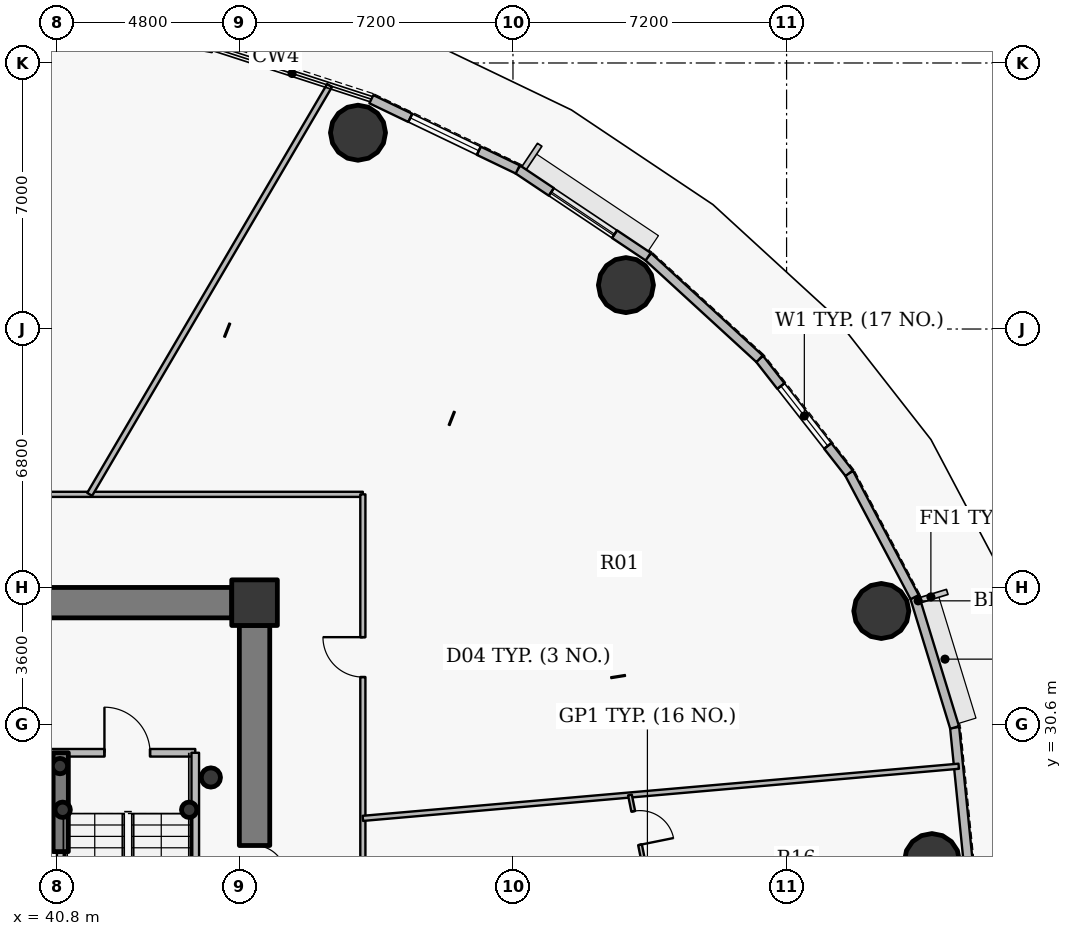
"""IFC4 building model, lengths in metres.
Left out: names, types, materials, properties, quantities, classifications, styles, units other than length and angle.
Written with IfcOpenShell. Run it as: python <this file> out.ifc"""

import sys

from ifc_helpers import new_model, si_unit, direction, frame, frame_2d, origin, origin_2d, place, context, subcontext, project, spatial, rectangle, hollow_circle, extrude, source, transform, mapped, element, fill, save


model = new_model("IFC4")
c1 = context("Model", 3, precision=1e-05, world=origin(), true_north=direction((0.0, 1.0)))
c2 = subcontext(c1, "Body", "Model", "MODEL_VIEW")
j1 = project(units=[si_unit("LENGTHUNIT", "METRE"), si_unit("PLANEANGLEUNIT", "RADIAN")], contexts=[c1])
p1 = place(None, origin())
s1 = spatial("IfcSite", under=j1, at=p1, CompositionType="ELEMENT")
p2 = place(p1, origin())
s2 = spatial("IfcBuilding", under=s1, at=p2, CompositionType="ELEMENT")
p3 = place(p2, frame((0.0, 0.0, 92.4)))
s3 = spatial("IfcBuildingStorey", under=s2, at=p3, CompositionType="ELEMENT", Elevation=92.4)
p4 = place(p3, frame((46.0, 33.8, 0.0), z_axis=(0.0, 0.0, 1.0), x_axis=(1.0, 0.0, 0.0)))
e1 = element("IfcColumn", 1, at=p4, inside=s3, PredefinedType="COLUMN", context=c2, shape_type="SweptSolid", body=[
    extrude(rectangle(XDim=1.2, YDim=1.2, at=origin_2d()), origin(), (0.0, 0.0, 1.0), 4.8),
])
for number, where, z_axis, x_axis in (
    (2, (40.95, 28.35, 0.0), (0.0, 0.0, 1.0), (1.0, 0.0, 0.0)),
    (3, (44.28, 28.35, 0.0), (0.0, 0.0, 1.0), (1.0, 0.0, 0.0)),
    (4, (40.88, 29.5, 0.0), (0.0, 0.0, 1.0), (1.0, 0.0, 0.0)),
):
    element("IfcColumn", number, at=place(p3, frame(where, z_axis=z_axis, x_axis=x_axis)), inside=s3, PredefinedType="COLUMN", context=c2, shape_type="SweptSolid", body=[
        extrude(hollow_circle(Radius=0.203, WallThickness=0.016, at=origin_2d()), origin(), (0.0, 0.0, 1.0), 4.8),
    ])
p5 = place(p3, frame((26.6, 33.8, 0.0), z_axis=(0.0, 0.0, 1.0), x_axis=(1.0, 0.0, 0.0)))
e5 = element("IfcWall", 5, at=p5, inside=s3, PredefinedType="SHEAR", context=c2, shape_type="SweptSolid", body=[
    extrude(rectangle(XDim=18.8, YDim=0.8, at=frame_2d((9.4, 0.0))), origin(), (0.0, 0.0, 1.0), 4.0),
])
p6 = place(p3, frame((46.0, 33.2, 0.0), z_axis=(0.0, 0.0, 1.0), x_axis=(0.0, -1.0, 0.0)))
e6 = element("IfcWall", 6, at=p6, inside=s3, PredefinedType="SHEAR", context=c2, shape_type="SweptSolid", body=[
    extrude(rectangle(XDim=12.4, YDim=0.8, at=frame_2d((6.2, 0.0))), origin(), (0.0, 0.0, 1.0), 4.0),
])
p7 = place(p6, frame((5.79, 0.0, 0.0)))
e7 = element("IfcOpeningElement", 7, at=p7, cuts=e6, PredefinedType="OPENING", context=c2, shape_type="SweptSolid", body=[
    extrude(rectangle(XDim=0.82, YDim=2.1, at=origin_2d()), frame((0.41, 0.41, 1.05), z_axis=(0.0, -1.0, 0.0), x_axis=(1.0, 0.0, 0.0)), (0.0, 0.0, 1.0), 0.82),
])
p8 = place(p3, frame((40.9, 27.25, 0.0), z_axis=(0.0, 0.0, 1.0), x_axis=(0.0, 1.0, 0.0)))
e8 = element("IfcWall", 8, at=p8, inside=s3, PredefinedType="SHEAR", context=c2, shape_type="SweptSolid", body=[
    extrude(rectangle(XDim=2.6, YDim=0.4, at=frame_2d((1.3, 0.0))), origin(), (0.0, 0.0, 1.0), 4.15),
])
for number, where, z_axis, x_axis in (
    (9, (63.825, 27.0, -0.3), (0.0, 0.0, 1.0), (1.0, 0.0, 0.0)),
    (10, (62.493, 33.581, -0.3), (0.0, 0.0, 1.0), (1.0, 0.0, 0.0)),
    (11, (55.773, 42.156, -0.3), (0.0, 0.0, 1.0), (1.0, 0.0, 0.0)),
    (12, (48.722, 46.165, -0.3), (0.0, 0.0, 1.0), (1.0, 0.0, 0.0)),
):
    element("IfcColumn", number, at=place(p3, frame(where, z_axis=z_axis, x_axis=x_axis)), inside=s3, PredefinedType="COLUMN", context=c2, shape_type="SweptSolid", body=[
        extrude(hollow_circle(Radius=0.725, WallThickness=0.042, at=origin_2d()), origin(), (0.0, 0.0, 1.0), 5.1),
    ])
p9 = place(p3, frame((44.85, 29.2, 0.0), z_axis=(0.0, 0.0, 1.0), x_axis=(1.0, 0.0, 0.0)))
e13 = element("IfcColumn", 13, at=p9, inside=s3, PredefinedType="COLUMN", context=c2, shape_type="SweptSolid", body=[
    extrude(hollow_circle(Radius=0.254, WallThickness=0.02, at=origin_2d()), origin(), (0.0, 0.0, 1.0), 4.8),
])
p10 = place(p3, frame((64.422, 30.515, 0.0), z_axis=(0.0, 0.0, 1.0), x_axis=(0.099989468229, -0.994988495533, 0.0)))
e14 = element("IfcWall", 14, at=p10, inside=s3, PredefinedType="SOLIDWALL", context=c2, shape_type="SweptSolid", body=[
    extrude(rectangle(XDim=3.533, YDim=0.24, at=frame_2d((1.767, 0.0))), origin(), (0.0, 0.0, 1.0), 4.55),
])
p11 = place(p3, frame((63.37, 33.945, 0.0), z_axis=(0.0, 0.0, 1.0), x_axis=(0.293124431344, -0.956074300329, 0.0)))
e15 = element("IfcWall", 15, at=p11, inside=s3, PredefinedType="SOLIDWALL", context=c2, shape_type="SweptSolid", body=[
    extrude(rectangle(XDim=3.587, YDim=0.24, at=frame_2d((1.793, 0.0))), origin(), (0.0, 0.0, 1.0), 4.55),
])
p12 = place(p3, frame((61.645, 37.206, 0.0), z_axis=(0.0, 0.0, 1.0), x_axis=(0.467614004126, -0.883932770716, 0.0)))
e16 = element("IfcWall", 16, at=p12, inside=s3, PredefinedType="SOLIDWALL", context=c2, shape_type="SweptSolid", body=[
    extrude(rectangle(XDim=3.689, YDim=0.24, at=frame_2d((1.844, 0.0))), origin(), (0.0, 0.0, 1.0), 4.55),
])
p13 = place(p3, frame((59.289, 40.217, 0.0), z_axis=(0.0, 0.0, 1.0), x_axis=(0.616272103517, -0.787533297345, 0.0)))
e17 = element("IfcWall", 17, at=p13, inside=s3, PredefinedType="SOLIDWALL", context=c2, shape_type="SweptSolid", body=[
    extrude(rectangle(XDim=3.823, YDim=0.24, at=frame_2d((1.912, 0.0))), origin(), (0.0, 0.0, 1.0), 4.55),
])
p14 = place(p13, frame((0.912, 0.0, 0.9)))
e18 = element("IfcOpeningElement", 18, at=p14, cuts=e17, PredefinedType="OPENING", context=c2, shape_type="SweptSolid", body=[
    extrude(rectangle(XDim=2.0, YDim=1.75, at=origin_2d()), frame((1.0, 0.13, 0.875), z_axis=(0.0, -1.0, 0.0), x_axis=(1.0, 0.0, 0.0)), (0.0, 0.0, 1.0), 0.26),
])
p15 = place(p3, frame((56.358, 42.903, 0.0), z_axis=(0.0, 0.0, 1.0), x_axis=(0.737113356241, -0.675769117414, 0.0)))
e19 = element("IfcWall", 19, at=p15, inside=s3, PredefinedType="SOLIDWALL", context=c2, shape_type="SweptSolid", body=[
    extrude(rectangle(XDim=3.976, YDim=0.24, at=frame_2d((1.988, 0.0))), origin(), (0.0, 0.0, 1.0), 4.55),
])
p16 = place(p3, frame((52.925, 45.199, 0.0), z_axis=(0.0, 0.0, 1.0), x_axis=(0.831221811447, -0.555940914284, 0.0)))
e20 = element("IfcWall", 20, at=p16, inside=s3, PredefinedType="SOLIDWALL", context=c2, shape_type="SweptSolid", body=[
    extrude(rectangle(XDim=4.13, YDim=0.24, at=frame_2d((2.065, 0.0))), origin(), (0.0, 0.0, 1.0), 4.55),
])
p17 = place(p16, frame((1.065, 0.0, 0.9)))
e21 = element("IfcOpeningElement", 21, at=p17, cuts=e20, PredefinedType="OPENING", context=c2, shape_type="SweptSolid", body=[
    extrude(rectangle(XDim=2.0, YDim=1.75, at=origin_2d()), frame((1.0, 0.13, 0.875), z_axis=(0.0, -1.0, 0.0), x_axis=(1.0, 0.0, 0.0)), (0.0, 0.0, 1.0), 0.26),
])
p18 = place(p3, frame((49.074, 47.047, 0.0), z_axis=(0.0, 0.0, 1.0), x_axis=(0.901589935876, -0.432591709962, 0.0)))
e22 = element("IfcWall", 22, at=p18, inside=s3, PredefinedType="SOLIDWALL", context=c2, shape_type="SweptSolid", body=[
    extrude(rectangle(XDim=4.272, YDim=0.24, at=frame_2d((2.136, 0.0))), origin(), (0.0, 0.0, 1.0), 4.55),
])
p19 = place(p18, frame((1.136, 0.0, 0.9)))
e23 = element("IfcOpeningElement", 23, at=p19, cuts=e22, PredefinedType="OPENING", context=c2, shape_type="SweptSolid", body=[
    extrude(rectangle(XDim=2.0, YDim=1.75, at=origin_2d()), frame((1.0, 0.13, 0.875), z_axis=(0.0, -1.0, 0.0), x_axis=(1.0, 0.0, 0.0)), (0.0, 0.0, 1.0), 0.26),
])
p20 = place(p3, frame((40.506, 49.227, 0.0), z_axis=(0.0, 0.0, 1.0), x_axis=(0.982789252177, -0.184730305596, 0.0)))
e24 = element("IfcWall", 24, at=p20, inside=s3, PredefinedType="SOLIDWALL", context=c2, shape_type="SweptSolid", body=[
    extrude(rectangle(XDim=4.471, YDim=0.24, at=frame_2d((2.235, 0.0))), origin(), (0.0, 0.0, 1.0), 4.55),
])
p21 = place(p20, frame((1.236, 0.0, 0.9)))
e25 = element("IfcOpeningElement", 25, at=p21, cuts=e24, PredefinedType="OPENING", context=c2, shape_type="SweptSolid", body=[
    extrude(rectangle(XDim=2.0, YDim=1.75, at=origin_2d()), frame((1.0, 0.13, 0.875), z_axis=(0.0, -1.0, 0.0), x_axis=(1.0, 0.0, 0.0)), (0.0, 0.0, 1.0), 0.26),
])
p22 = place(p3, frame((23.15, 36.65, 0.0), z_axis=(0.0, 0.0, 1.0), x_axis=(1.0, 0.0, 0.0)))
e26 = element("IfcWall", 26, at=p22, inside=s3, PredefinedType="PARTITIONING", context=c2, shape_type="SweptSolid", body=[
    extrude(rectangle(XDim=25.7, YDim=0.135, at=frame_2d((12.85, 0.0))), origin(), (0.0, 0.0, 1.0), 3.985),
])
p23 = place(p22, frame((13.736, 0.0, 0.0)))
e27 = element("IfcOpeningElement", 27, at=p23, cuts=e26, PredefinedType="OPENING", context=c2, shape_type="SweptSolid", body=[
    extrude(rectangle(XDim=1.05, YDim=2.15, at=origin_2d()), frame((0.525, 0.078, 1.075), z_axis=(0.0, -1.0, 0.0), x_axis=(1.0, 0.0, 0.0)), (0.0, 0.0, 1.0), 0.155),
])
p24 = place(p22, frame((6.195, 0.0, 0.0)))
e28 = element("IfcOpeningElement", 28, at=p24, cuts=e26, PredefinedType="OPENING", context=c2, shape_type="SweptSolid", body=[
    extrude(rectangle(XDim=0.82, YDim=2.1, at=origin_2d()), frame((0.41, 0.078, 1.05), z_axis=(0.0, -1.0, 0.0), x_axis=(1.0, 0.0, 0.0)), (0.0, 0.0, 1.0), 0.155),
])
p25 = place(p3, frame((35.95, 29.85, 0.0), z_axis=(0.0, 0.0, 1.0), x_axis=(1.0, 0.0, 0.0)))
e29 = element("IfcWall", 29, at=p25, inside=s3, PredefinedType="PARTITIONING", context=c2, shape_type="SweptSolid", body=[
    extrude(rectangle(XDim=8.49, YDim=0.2, at=frame_2d((4.245, 0.0))), origin(), (0.0, 0.0, 1.0), 4.135),
])
p26 = place(p25, frame((6.1, 0.0, 0.0)))
e30 = element("IfcOpeningElement", 30, at=p26, cuts=e29, PredefinedType="OPENING", context=c2, shape_type="SweptSolid", body=[
    extrude(rectangle(XDim=1.2, YDim=2.15, at=origin_2d()), frame((0.6, 0.11, 1.075), z_axis=(0.0, -1.0, 0.0), x_axis=(1.0, 0.0, 0.0)), (0.0, 0.0, 1.0), 0.22),
])
p27 = place(p25, frame((0.37, 0.0, 0.0)))
e31 = element("IfcOpeningElement", 31, at=p27, cuts=e29, PredefinedType="OPENING", context=c2, shape_type="SweptSolid", body=[
    extrude(rectangle(XDim=1.15, YDim=2.15, at=origin_2d()), frame((0.575, 0.11, 1.075), z_axis=(0.0, -1.0, 0.0), x_axis=(1.0, 0.0, 0.0)), (0.0, 0.0, 1.0), 0.22),
])
p28 = place(p25, frame((2.425, 0.0, 0.0)))
e32 = element("IfcOpeningElement", 32, at=p28, cuts=e29, PredefinedType="OPENING", context=c2, shape_type="SweptSolid", body=[
    extrude(rectangle(XDim=1.05, YDim=2.15, at=origin_2d()), frame((0.525, 0.11, 1.075), z_axis=(0.0, -1.0, 0.0), x_axis=(1.0, 0.0, 0.0)), (0.0, 0.0, 1.0), 0.22),
])
p29 = place(p3, frame((40.0, 27.85, 0.0), z_axis=(0.0, 0.0, 1.0), x_axis=(1.0, 0.0, 0.0)))
e33 = element("IfcWall", 33, at=p29, inside=s3, PredefinedType="PARTITIONING", context=c2, shape_type="SweptSolid", body=[
    extrude(rectangle(XDim=0.9, YDim=0.2, at=frame_2d((0.45, 0.0))), origin(), (0.0, 0.0, 1.0), 4.55),
])
p30 = place(p3, frame((40.9, 21.33, 0.0), z_axis=(0.0, 0.0, 1.0), x_axis=(0.0, 1.0, 0.0)))
e34 = element("IfcWall", 34, at=p30, inside=s3, PredefinedType="PARTITIONING", context=c2, shape_type="SweptSolid", body=[
    extrude(rectangle(XDim=5.91, YDim=0.2, at=frame_2d((2.955, 0.0))), origin(), (0.0, 0.0, 1.0), 4.085),
])
p31 = place(p3, frame((41.662, 36.65, 0.0), z_axis=(0.0, 0.0, 1.0), x_axis=(0.506029365316, 0.862516249956, 0.0)))
e35 = element("IfcWall", 35, at=p31, inside=s3, PredefinedType="PARTITIONING", context=c2, shape_type="SweptSolid", body=[
    extrude(rectangle(XDim=12.475, YDim=0.15, at=frame_2d((6.237, 0.0))), origin(), (0.0, 0.0, 1.0), 3.985),
])
p32 = place(p3, frame((44.44, 21.33, 0.0), z_axis=(0.0, 0.0, 1.0), x_axis=(0.0, 1.0, 0.0)))
e36 = element("IfcWall", 36, at=p32, inside=s3, PredefinedType="PARTITIONING", context=c2, shape_type="SweptSolid", body=[
    extrude(rectangle(XDim=8.52, YDim=0.2, at=frame_2d((4.26, 0.0))), origin(), (0.0, 0.0, 1.0), 4.55),
])
p33 = place(p3, frame((48.85, 17.35, 0.0), z_axis=(0.0, 0.0, 1.0), x_axis=(0.0, 1.0, 0.0)))
e37 = element("IfcWall", 37, at=p33, inside=s3, PredefinedType="PARTITIONING", context=c2, shape_type="SweptSolid", body=[
    extrude(rectangle(XDim=19.3, YDim=0.135, at=frame_2d((9.65, 0.0))), origin(), (0.0, 0.0, 1.0), 3.985),
])
p34 = place(p33, frame((4.907, 0.0, 0.0)))
e38 = element("IfcOpeningElement", 38, at=p34, cuts=e37, PredefinedType="OPENING", context=c2, shape_type="SweptSolid", body=[
    extrude(rectangle(XDim=1.0, YDim=2.15, at=origin_2d()), frame((0.5, 0.078, 1.075), z_axis=(0.0, -1.0, 0.0), x_axis=(1.0, 0.0, 0.0)), (0.0, 0.0, 1.0), 0.155),
])
p35 = place(p33, frame((14.492, 0.0, 0.0)))
e39 = element("IfcOpeningElement", 39, at=p35, cuts=e37, PredefinedType="OPENING", context=c2, shape_type="SweptSolid", body=[
    extrude(rectangle(XDim=1.05, YDim=2.15, at=origin_2d()), frame((0.525, 0.078, 1.075), z_axis=(0.0, -1.0, 0.0), x_axis=(1.0, 0.0, 0.0)), (0.0, 0.0, 1.0), 0.155),
])
p36 = place(p3, frame((48.85, 28.124, 0.0), z_axis=(0.0, 0.0, 1.0), x_axis=(0.99619417209, 0.087161754768, 0.0)))
e40 = element("IfcWall", 40, at=p36, inside=s3, PredefinedType="PARTITIONING", context=c2, shape_type="SweptSolid", body=[
    extrude(rectangle(XDim=15.739, YDim=0.135, at=frame_2d((7.869, 0.0))), origin(), (0.0, 0.0, 1.0), 3.985),
])
p37 = place(p3, frame((55.878, 28.739, 0.0), z_axis=(0.0, 0.0, 1.0), x_axis=(0.198285544288, -0.980144296992, 0.0)))
e41 = element("IfcWall", 41, at=p37, inside=s3, PredefinedType="PARTITIONING", context=c2, shape_type="SweptSolid", body=[
    extrude(rectangle(XDim=1.774, YDim=0.1, at=frame_2d((0.887, 0.0))), origin(), (0.0, 0.0, 1.0), 3.985),
])
p38 = place(p37, frame((0.437, 0.0, 0.0)))
e42 = element("IfcOpeningElement", 42, at=p38, cuts=e41, PredefinedType="OPENING", context=c2, shape_type="SweptSolid", body=[
    extrude(rectangle(XDim=0.9, YDim=2.1, at=origin_2d()), frame((0.45, 0.06, 1.05), z_axis=(0.0, -1.0, 0.0), x_axis=(1.0, 0.0, 0.0)), (0.0, 0.0, 1.0), 0.12),
])
p39 = place(p3, frame((46.4, 34.2, 0.0), z_axis=(0.0, 0.0, 1.0), x_axis=(-1.0, 0.0, 0.0)))
e43 = element("IfcWall", 43, at=p39, inside=s3, PredefinedType="PARTITIONING", context=c2, shape_type="SweptSolid", body=[
    extrude(rectangle(XDim=0.99, YDim=0.135, at=frame_2d((0.495, 0.0))), origin(), (0.0, 0.0, 1.0), 3.985),
])
p40 = place(p3, frame((46.4, 33.21, 0.0), z_axis=(0.0, 0.0, 1.0), x_axis=(0.0, 1.0, 0.0)))
e44 = element("IfcWall", 44, at=p40, inside=s3, PredefinedType="PARTITIONING", context=c2, shape_type="SweptSolid", body=[
    extrude(rectangle(XDim=0.683, YDim=0.135, at=frame_2d((0.341, 0.0))), origin(), (0.0, 0.0, 1.0), 4.55),
])
m1 = source(origin(), c2, "Body", "SweptSolid", [
    extrude(rectangle(XDim=2.0, YDim=1.75, at=origin_2d()), frame((1.0, 0.03, 0.875), z_axis=(0.0, -1.0, 0.0), x_axis=(1.0, 0.0, 0.0)), (0.0, 0.0, 1.0), 0.06),
])
p41 = place(p14, origin())
e45 = element("IfcWindow", 45, at=p41, inside=s3, PartitioningType="DOUBLE_PANEL_VERTICAL", PredefinedType="WINDOW", context=c2, shape_type="MappedRepresentation", body=[
    mapped(m1, transform((0.0, 0.0, 0.0), x_axis=(1.0, 0.0, 0.0), y_axis=(0.0, 1.0, 0.0), z_axis=(0.0, 0.0, 1.0), scale=1.0)),
])
fill(e18, e45)
p42 = place(p17, origin())
e46 = element("IfcWindow", 46, at=p42, inside=s3, PartitioningType="DOUBLE_PANEL_VERTICAL", PredefinedType="WINDOW", context=c2, shape_type="MappedRepresentation", body=[
    mapped(m1, transform((0.0, 0.0, 0.0), x_axis=(1.0, 0.0, 0.0), y_axis=(0.0, 1.0, 0.0), z_axis=(0.0, 0.0, 1.0), scale=1.0)),
])
fill(e21, e46)
p43 = place(p19, origin())
e47 = element("IfcWindow", 47, at=p43, inside=s3, PartitioningType="DOUBLE_PANEL_VERTICAL", PredefinedType="WINDOW", context=c2, shape_type="MappedRepresentation", body=[
    mapped(m1, transform((0.0, 0.0, 0.0), x_axis=(1.0, 0.0, 0.0), y_axis=(0.0, 1.0, 0.0), z_axis=(0.0, 0.0, 1.0), scale=1.0)),
])
fill(e23, e47)
m2 = source(origin(), c2, "Body", "SweptSolid", [
    extrude(rectangle(XDim=0.82, YDim=2.1, at=origin_2d()), frame((0.41, 0.025, 1.05), z_axis=(0.0, -1.0, 0.0), x_axis=(1.0, 0.0, 0.0)), (0.0, 0.0, 1.0), 0.05),
])
p44 = place(p7, origin())
e48 = element("IfcDoor", 48, at=p44, inside=s3, OperationType="SINGLE_SWING_RIGHT", PredefinedType="DOOR", context=c2, shape_type="MappedRepresentation", body=[
    mapped(m2, transform((0.0, 0.0, 0.0), x_axis=(1.0, 0.0, 0.0), y_axis=(0.0, 1.0, 0.0), z_axis=(0.0, 0.0, 1.0), scale=1.0)),
])
fill(e7, e48)
m3 = source(origin(), c2, "Body", "SweptSolid", [
    extrude(rectangle(XDim=1.2, YDim=2.15, at=origin_2d()), frame((0.6, 0.025, 1.075), z_axis=(0.0, -1.0, 0.0), x_axis=(1.0, 0.0, 0.0)), (0.0, 0.0, 1.0), 0.05),
])
p45 = place(p26, origin())
e49 = element("IfcDoor", 49, at=p45, inside=s3, OperationType="SINGLE_SWING_LEFT", PredefinedType="DOOR", context=c2, shape_type="MappedRepresentation", body=[
    mapped(m3, transform((0.0, 0.0, 0.0), x_axis=(1.0, 0.0, 0.0), y_axis=(0.0, 1.0, 0.0), z_axis=(0.0, 0.0, 1.0), scale=1.0)),
])
fill(e30, e49)
m4 = source(origin(), c2, "Body", "SweptSolid", [
    extrude(rectangle(XDim=0.9, YDim=2.1, at=origin_2d()), frame((0.45, 0.025, 1.05), z_axis=(0.0, -1.0, 0.0), x_axis=(1.0, 0.0, 0.0)), (0.0, 0.0, 1.0), 0.05),
])
p46 = place(p38, origin())
e50 = element("IfcDoor", 50, at=p46, inside=s3, OperationType="SINGLE_SWING_RIGHT", PredefinedType="DOOR", context=c2, shape_type="MappedRepresentation", body=[
    mapped(m4, transform((0.0, 0.0, 0.0), x_axis=(1.0, 0.0, 0.0), y_axis=(0.0, 1.0, 0.0), z_axis=(0.0, 0.0, 1.0), scale=1.0)),
])
fill(e42, e50)
m5 = source(origin(), c2, "Body", "SweptSolid", [
    extrude(rectangle(XDim=1.05, YDim=2.15, at=origin_2d()), frame((0.525, 0.025, 1.075), z_axis=(0.0, -1.0, 0.0), x_axis=(1.0, 0.0, 0.0)), (0.0, 0.0, 1.0), 0.05),
])
p47 = place(p35, origin())
e51 = element("IfcDoor", 51, at=p47, inside=s3, OperationType="SINGLE_SWING_RIGHT", PredefinedType="DOOR", context=c2, shape_type="MappedRepresentation", body=[
    mapped(m5, transform((0.0, 0.0, 0.0), x_axis=(1.0, 0.0, 0.0), y_axis=(0.0, 1.0, 0.0), z_axis=(0.0, 0.0, 1.0), scale=1.0)),
])
fill(e39, e51)
save(model, sys.argv[1])
